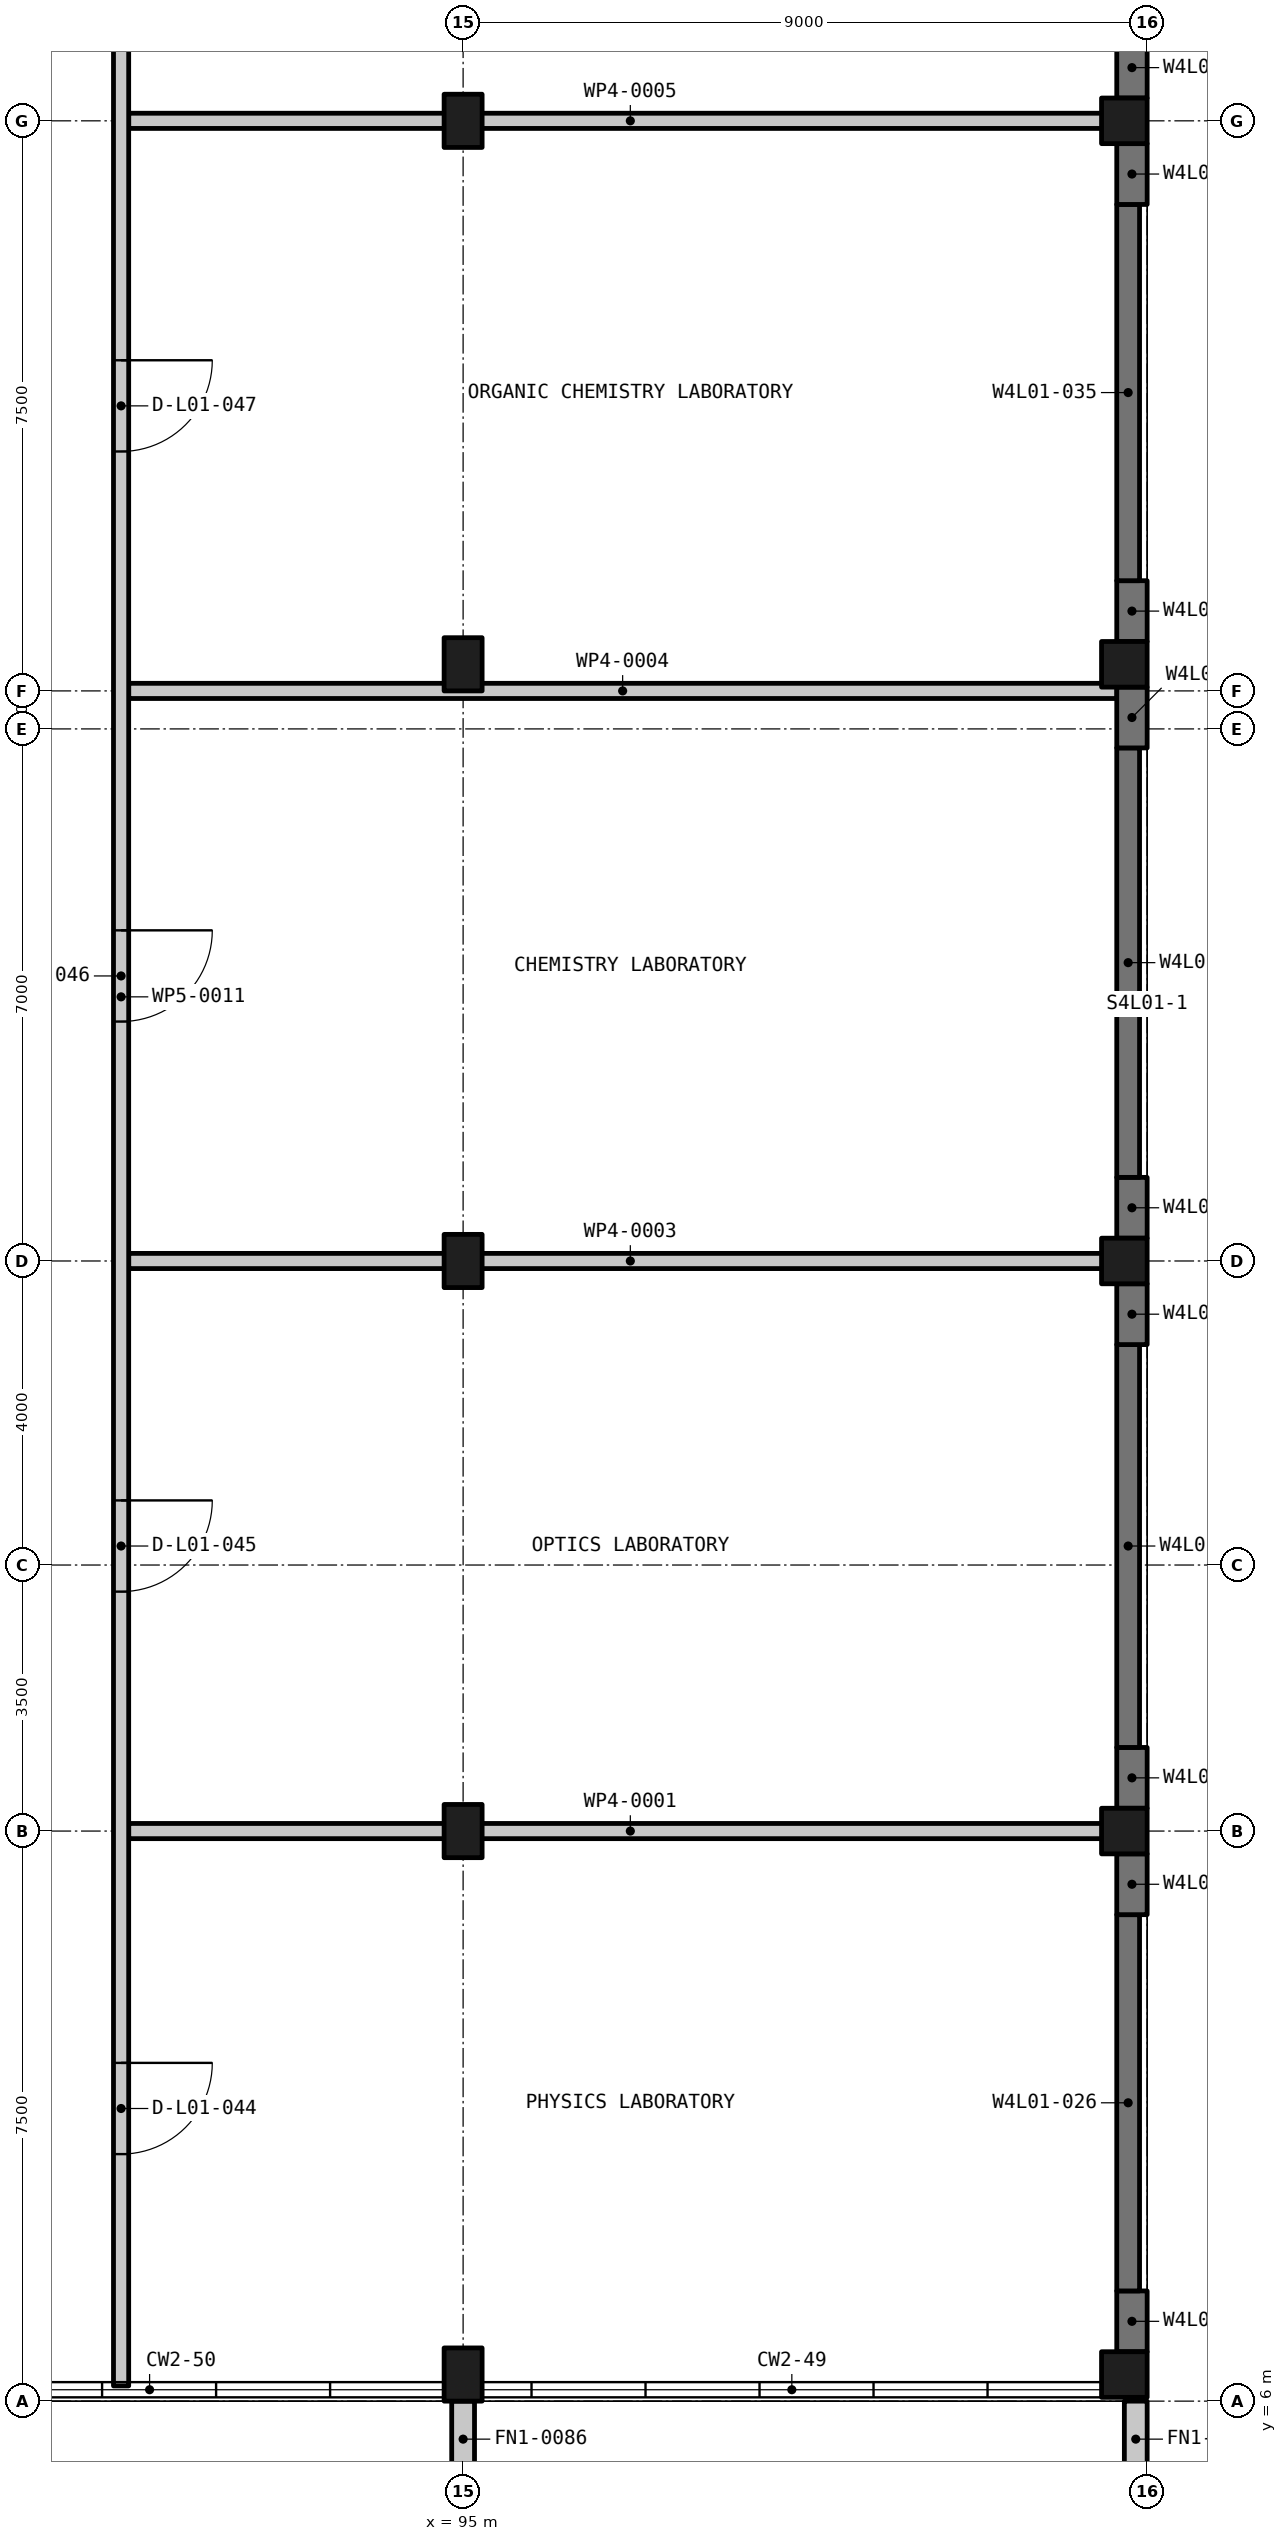
"""IFC4 building model, lengths in metres.
Left out: names, types, materials, properties, quantities, classifications, styles, units other than length and angle.
Written with IfcOpenShell. Run it as: python <this file> out.ifc"""

import sys

from ifc_helpers import new_model, si_unit, direction, frame, frame_2d, origin, origin_2d, place, context, subcontext, project, spatial, rectangle, extrude, element, fill, save


model = new_model("IFC4")
c1 = context("Model", 3, precision=1e-05, world=origin(), true_north=direction((0.0, 1.0)))
c2 = subcontext(c1, "Body", "Model", "MODEL_VIEW")
j1 = project(units=[si_unit("LENGTHUNIT", "METRE"), si_unit("PLANEANGLEUNIT", "RADIAN")], contexts=[c1])
p1 = place(None, origin())
s1 = spatial("IfcSite", under=j1, at=p1, CompositionType="ELEMENT")
p2 = place(p1, origin())
s2 = spatial("IfcBuilding", under=s1, at=p2, CompositionType="ELEMENT")
p3 = place(p2, frame((0.0, 0.0, 6.0)))
s3 = spatial("IfcBuildingStorey", under=s2, at=p3, CompositionType="ELEMENT", Elevation=6.0)
for number, where, z_axis, x_axis in (
    (1, (95.0, 6.35, -0.3), (0.0, 0.0, 1.0), (1.0, 0.0, 0.0)),
    (2, (95.0, 13.5, -0.3), (0.0, 0.0, 1.0), (1.0, 0.0, 0.0)),
    (3, (95.0, 21.0, -0.3), (0.0, 0.0, 1.0), (1.0, 0.0, 0.0)),
    (4, (95.0, 28.85, -0.3), (0.0, 0.0, 1.0), (1.0, 0.0, 0.0)),
    (5, (95.0, 36.0, -0.3), (0.0, 0.0, 1.0), (1.0, 0.0, 0.0)),
):
    element("IfcColumn", number, at=place(p3, frame(where, z_axis=z_axis, x_axis=x_axis)), inside=s3, PredefinedType="COLUMN", context=c2, shape_type="SweptSolid", body=[
        extrude(rectangle(XDim=0.5, YDim=0.7, at=origin_2d()), origin(), (0.0, 0.0, 1.0), 5.25),
    ])
for number, where, z_axis, x_axis in (
    (6, (103.7, 6.35, -0.3), (0.0, 0.0, 1.0), (1.0, 0.0, 0.0)),
    (7, (103.7, 13.5, -0.3), (0.0, 0.0, 1.0), (1.0, 0.0, 0.0)),
    (8, (103.7, 21.0, -0.3), (0.0, 0.0, 1.0), (1.0, 0.0, 0.0)),
    (9, (103.7, 28.85, -0.3), (0.0, 0.0, 1.0), (1.0, 0.0, 0.0)),
    (10, (103.7, 36.0, -0.3), (0.0, 0.0, 1.0), (1.0, 0.0, 0.0)),
):
    element("IfcColumn", number, at=place(p3, frame(where, z_axis=z_axis, x_axis=x_axis)), inside=s3, PredefinedType="COLUMN", context=c2, shape_type="SweptSolid", body=[
        extrude(rectangle(XDim=0.6, YDim=0.6, at=origin_2d()), origin(), (0.0, 0.0, 1.0), 5.25),
    ])
p4 = place(p3, frame((103.8, 6.65, -0.3), z_axis=(0.0, 0.0, 1.0), x_axis=(0.0, 1.0, 0.0)))
e11 = element("IfcWall", 11, at=p4, inside=s3, PredefinedType="SOLIDWALL", context=c2, shape_type="SweptSolid", body=[
    extrude(rectangle(XDim=0.8, YDim=0.4, at=frame_2d((0.4, 0.0))), origin(), (0.0, 0.0, 1.0), 5.25),
])
p5 = place(p3, frame((103.75, 7.45, -0.3), z_axis=(0.0, 0.0, 1.0), x_axis=(0.0, 1.0, 0.0)))
e12 = element("IfcWall", 12, at=p5, inside=s3, PredefinedType="SOLIDWALL", context=c2, shape_type="SweptSolid", body=[
    extrude(rectangle(XDim=4.95, YDim=0.3, at=frame_2d((2.475, 0.0))), origin(), (0.0, 0.0, 1.0), 5.25),
])
for number, where, z_axis, x_axis in (
    (13, (103.8, 12.4, -0.3), (0.0, 0.0, 1.0), (0.0, 1.0, 0.0)),
    (14, (103.8, 13.8, -0.3), (0.0, 0.0, 1.0), (0.0, 1.0, 0.0)),
):
    element("IfcWall", number, at=place(p3, frame(where, z_axis=z_axis, x_axis=x_axis)), inside=s3, PredefinedType="SOLIDWALL", context=c2, shape_type="SweptSolid", body=[
        extrude(rectangle(XDim=0.8, YDim=0.4, at=frame_2d((0.4, 0.0))), origin(), (0.0, 0.0, 1.0), 5.25),
    ])
p6 = place(p3, frame((103.75, 14.6, -0.3), z_axis=(0.0, 0.0, 1.0), x_axis=(0.0, 1.0, 0.0)))
e15 = element("IfcWall", 15, at=p6, inside=s3, PredefinedType="SOLIDWALL", context=c2, shape_type="SweptSolid", body=[
    extrude(rectangle(XDim=5.3, YDim=0.3, at=frame_2d((2.65, 0.0))), origin(), (0.0, 0.0, 1.0), 5.25),
])
for number, where, z_axis, x_axis in (
    (16, (103.8, 19.9, -0.3), (0.0, 0.0, 1.0), (0.0, 1.0, 0.0)),
    (17, (103.8, 21.3, -0.3), (0.0, 0.0, 1.0), (0.0, 1.0, 0.0)),
):
    element("IfcWall", number, at=place(p3, frame(where, z_axis=z_axis, x_axis=x_axis)), inside=s3, PredefinedType="SOLIDWALL", context=c2, shape_type="SweptSolid", body=[
        extrude(rectangle(XDim=0.8, YDim=0.4, at=frame_2d((0.4, 0.0))), origin(), (0.0, 0.0, 1.0), 5.25),
    ])
p7 = place(p3, frame((103.75, 22.1, -0.3), z_axis=(0.0, 0.0, 1.0), x_axis=(0.0, 1.0, 0.0)))
e18 = element("IfcWall", 18, at=p7, inside=s3, PredefinedType="SOLIDWALL", context=c2, shape_type="SweptSolid", body=[
    extrude(rectangle(XDim=5.65, YDim=0.3, at=frame_2d((2.825, 0.0))), origin(), (0.0, 0.0, 1.0), 5.25),
])
for number, where, z_axis, x_axis in (
    (19, (103.8, 27.75, -0.3), (0.0, 0.0, 1.0), (0.0, 1.0, 0.0)),
    (20, (103.8, 29.15, -0.3), (0.0, 0.0, 1.0), (0.0, 1.0, 0.0)),
):
    element("IfcWall", number, at=place(p3, frame(where, z_axis=z_axis, x_axis=x_axis)), inside=s3, PredefinedType="SOLIDWALL", context=c2, shape_type="SweptSolid", body=[
        extrude(rectangle(XDim=0.8, YDim=0.4, at=frame_2d((0.4, 0.0))), origin(), (0.0, 0.0, 1.0), 5.25),
    ])
p8 = place(p3, frame((103.75, 29.95, -0.3), z_axis=(0.0, 0.0, 1.0), x_axis=(0.0, 1.0, 0.0)))
e21 = element("IfcWall", 21, at=p8, inside=s3, PredefinedType="SOLIDWALL", context=c2, shape_type="SweptSolid", body=[
    extrude(rectangle(XDim=4.95, YDim=0.3, at=frame_2d((2.475, 0.0))), origin(), (0.0, 0.0, 1.0), 5.25),
])
for number, where, z_axis, x_axis in (
    (22, (103.8, 34.9, -0.3), (0.0, 0.0, 1.0), (0.0, 1.0, 0.0)),
    (23, (103.8, 36.3, -0.3), (0.0, 0.0, 1.0), (0.0, 1.0, 0.0)),
):
    element("IfcWall", number, at=place(p3, frame(where, z_axis=z_axis, x_axis=x_axis)), inside=s3, PredefinedType="SOLIDWALL", context=c2, shape_type="SweptSolid", body=[
        extrude(rectangle(XDim=0.8, YDim=0.4, at=frame_2d((0.4, 0.0))), origin(), (0.0, 0.0, 1.0), 5.25),
    ])
for number, where, z_axis, x_axis in (
    (24, (95.0, 6.0, 0.0), (0.0, 0.0, 1.0), (0.0, -1.0, 0.0)),
    (25, (103.85, 6.0, 0.0), (0.0, 0.0, 1.0), (0.0, -1.0, 0.0)),
):
    element("IfcWall", number, at=place(p3, frame(where, z_axis=z_axis, x_axis=x_axis)), inside=s3, PredefinedType="SOLIDWALL", context=c2, shape_type="SweptSolid", body=[
        extrude(rectangle(XDim=1.0, YDim=0.3, at=frame_2d((0.5, 0.0))), origin(), (0.0, 0.0, 1.0), 5.25),
    ])
for number, where, z_axis, x_axis in (
    (26, (90.6, 13.5, 0.0), (0.0, 0.0, 1.0), (1.0, 0.0, 0.0)),
    (27, (90.6, 21.0, 0.0), (0.0, 0.0, 1.0), (1.0, 0.0, 0.0)),
):
    element("IfcWall", number, at=place(p3, frame(where, z_axis=z_axis, x_axis=x_axis)), inside=s3, PredefinedType="PARTITIONING", context=c2, shape_type="SweptSolid", body=[
        extrude(rectangle(XDim=13.2, YDim=0.2, at=frame_2d((6.6, 0.0))), origin(), (0.0, 0.0, 1.0), 4.05),
    ])
p9 = place(p3, frame((90.6, 28.5, 0.0), z_axis=(0.0, 0.0, 1.0), x_axis=(1.0, 0.0, 0.0)))
e28 = element("IfcWall", 28, at=p9, inside=s3, PredefinedType="PARTITIONING", context=c2, shape_type="SweptSolid", body=[
    extrude(rectangle(XDim=12.998, YDim=0.2, at=frame_2d((6.499, 0.0))), origin(), (0.0, 0.0, 1.0), 4.15),
])
p10 = place(p3, frame((90.6, 36.0, 0.0), z_axis=(0.0, 0.0, 1.0), x_axis=(1.0, 0.0, 0.0)))
e29 = element("IfcWall", 29, at=p10, inside=s3, PredefinedType="PARTITIONING", context=c2, shape_type="SweptSolid", body=[
    extrude(rectangle(XDim=13.2, YDim=0.2, at=frame_2d((6.6, 0.0))), origin(), (0.0, 0.0, 1.0), 4.15),
])
p11 = place(p3, frame((90.5, 80.8, 0.0), z_axis=(0.0, 0.0, 1.0), x_axis=(0.0, -1.0, 0.0)))
e30 = element("IfcWall", 30, at=p11, inside=s3, PredefinedType="PARTITIONING", context=c2, shape_type="SweptSolid", body=[
    extrude(rectangle(XDim=74.6, YDim=0.2, at=frame_2d((37.3, 0.0))), origin(), (0.0, 0.0, 1.0), 4.05),
])
p12 = place(p11, frame((70.35, 0.0, 0.0)))
e31 = element("IfcOpeningElement", 31, at=p12, cuts=e30, PredefinedType="OPENING", context=c2, shape_type="SweptSolid", body=[
    extrude(rectangle(XDim=1.2, YDim=2.1, at=frame_2d((0.6, 1.05))), frame((0.0, 0.11, 0.0), z_axis=(0.0, -1.0, 0.0), x_axis=(1.0, 0.0, 0.0)), (0.0, 0.0, 1.0), 0.22),
])
p13 = place(p11, frame((62.95, 0.0, 0.0)))
e32 = element("IfcOpeningElement", 32, at=p13, cuts=e30, PredefinedType="OPENING", context=c2, shape_type="SweptSolid", body=[
    extrude(rectangle(XDim=1.2, YDim=2.1, at=frame_2d((0.6, 1.05))), frame((0.0, 0.11, 0.0), z_axis=(0.0, -1.0, 0.0), x_axis=(1.0, 0.0, 0.0)), (0.0, 0.0, 1.0), 0.22),
])
p14 = place(p11, frame((55.45, 0.0, 0.0)))
e33 = element("IfcOpeningElement", 33, at=p14, cuts=e30, PredefinedType="OPENING", context=c2, shape_type="SweptSolid", body=[
    extrude(rectangle(XDim=1.2, YDim=2.1, at=frame_2d((0.6, 1.05))), frame((0.0, 0.11, 0.0), z_axis=(0.0, -1.0, 0.0), x_axis=(1.0, 0.0, 0.0)), (0.0, 0.0, 1.0), 0.22),
])
p15 = place(p11, frame((47.95, 0.0, 0.0)))
e34 = element("IfcOpeningElement", 34, at=p15, cuts=e30, PredefinedType="OPENING", context=c2, shape_type="SweptSolid", body=[
    extrude(rectangle(XDim=1.2, YDim=2.1, at=frame_2d((0.6, 1.05))), frame((0.0, 0.11, 0.0), z_axis=(0.0, -1.0, 0.0), x_axis=(1.0, 0.0, 0.0)), (0.0, 0.0, 1.0), 0.22),
])
p16 = place(p11, frame((40.45, 0.0, 0.0)))
e35 = element("IfcOpeningElement", 35, at=p16, cuts=e30, PredefinedType="OPENING", context=c2, shape_type="SweptSolid", body=[
    extrude(rectangle(XDim=1.2, YDim=2.1, at=frame_2d((0.6, 1.05))), frame((0.0, 0.11, 0.0), z_axis=(0.0, -1.0, 0.0), x_axis=(1.0, 0.0, 0.0)), (0.0, 0.0, 1.0), 0.22),
])
p17 = place(p11, frame((35.199, 0.0, 0.0)))
e36 = element("IfcOpeningElement", 36, at=p17, cuts=e30, PredefinedType="OPENING", context=c2, shape_type="SweptSolid", body=[
    extrude(rectangle(XDim=1.2, YDim=2.1, at=frame_2d((0.6, 1.05))), frame((0.0, 0.11, 0.0), z_axis=(0.0, -1.0, 0.0), x_axis=(1.0, 0.0, 0.0)), (0.0, 0.0, 1.0), 0.22),
])
p18 = place(p11, frame((24.201, 0.0, 0.0)))
e37 = element("IfcOpeningElement", 37, at=p18, cuts=e30, PredefinedType="OPENING", context=c2, shape_type="SweptSolid", body=[
    extrude(rectangle(XDim=1.2, YDim=2.1, at=frame_2d((0.6, 1.05))), frame((0.0, 0.11, 0.0), z_axis=(0.0, -1.0, 0.0), x_axis=(1.0, 0.0, 0.0)), (0.0, 0.0, 1.0), 0.22),
])
p19 = place(p11, frame((17.95, 0.0, 0.0)))
e38 = element("IfcOpeningElement", 38, at=p19, cuts=e30, PredefinedType="OPENING", context=c2, shape_type="SweptSolid", body=[
    extrude(rectangle(XDim=1.2, YDim=2.1, at=frame_2d((0.6, 1.05))), frame((0.0, 0.11, 0.0), z_axis=(0.0, -1.0, 0.0), x_axis=(1.0, 0.0, 0.0)), (0.0, 0.0, 1.0), 0.22),
])
p20 = place(p11, frame((6.825, 0.0, 0.0)))
e39 = element("IfcOpeningElement", 39, at=p20, cuts=e30, PredefinedType="OPENING", context=c2, shape_type="SweptSolid", body=[
    extrude(rectangle(XDim=1.2, YDim=2.1, at=frame_2d((0.6, 1.05))), frame((0.0, 0.11, 0.0), z_axis=(0.0, -1.0, 0.0), x_axis=(1.0, 0.0, 0.0)), (0.0, 0.0, 1.0), 0.22),
])
p21 = place(p12, origin())
e40 = element("IfcDoor", 40, at=p21, inside=s3, OperationType="SINGLE_SWING_LEFT", PredefinedType="DOOR", context=c2, shape_type="SweptSolid", body=[
    extrude(rectangle(XDim=1.2, YDim=2.1, at=frame_2d((0.6, 1.05))), frame((0.0, 0.025, 0.0), z_axis=(0.0, -1.0, 0.0), x_axis=(1.0, 0.0, 0.0)), (0.0, 0.0, 1.0), 0.05),
])
fill(e31, e40)
p22 = place(p13, origin())
e41 = element("IfcDoor", 41, at=p22, inside=s3, OperationType="SINGLE_SWING_LEFT", PredefinedType="DOOR", context=c2, shape_type="SweptSolid", body=[
    extrude(rectangle(XDim=1.2, YDim=2.1, at=frame_2d((0.6, 1.05))), frame((0.0, 0.025, 0.0), z_axis=(0.0, -1.0, 0.0), x_axis=(1.0, 0.0, 0.0)), (0.0, 0.0, 1.0), 0.05),
])
fill(e32, e41)
p23 = place(p14, origin())
e42 = element("IfcDoor", 42, at=p23, inside=s3, OperationType="SINGLE_SWING_LEFT", PredefinedType="DOOR", context=c2, shape_type="SweptSolid", body=[
    extrude(rectangle(XDim=1.2, YDim=2.1, at=frame_2d((0.6, 1.05))), frame((0.0, 0.025, 0.0), z_axis=(0.0, -1.0, 0.0), x_axis=(1.0, 0.0, 0.0)), (0.0, 0.0, 1.0), 0.05),
])
fill(e33, e42)
p24 = place(p15, origin())
e43 = element("IfcDoor", 43, at=p24, inside=s3, OperationType="SINGLE_SWING_LEFT", PredefinedType="DOOR", context=c2, shape_type="SweptSolid", body=[
    extrude(rectangle(XDim=1.2, YDim=2.1, at=frame_2d((0.6, 1.05))), frame((0.0, 0.025, 0.0), z_axis=(0.0, -1.0, 0.0), x_axis=(1.0, 0.0, 0.0)), (0.0, 0.0, 1.0), 0.05),
])
fill(e34, e43)
save(model, sys.argv[1])
